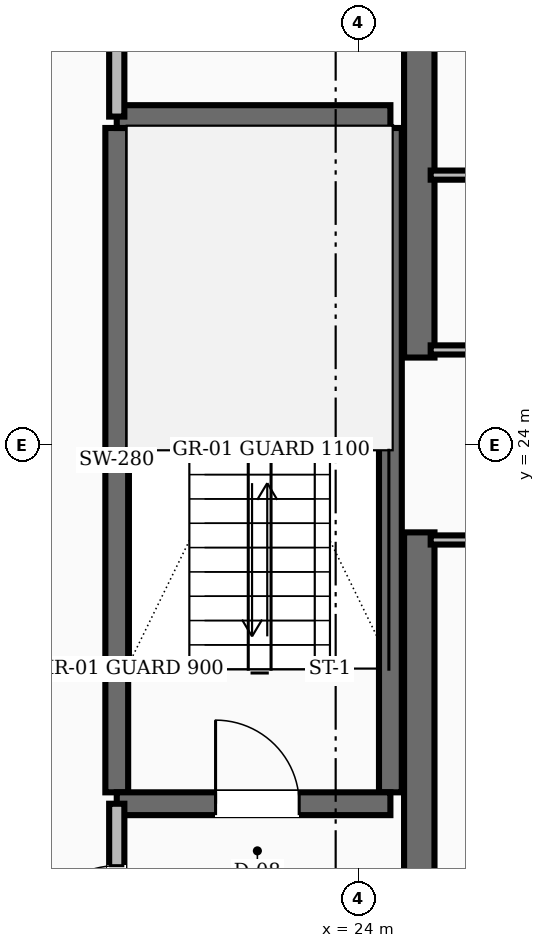
"""IFC4 building model, lengths in metres.
Left out: names, types, materials, properties, quantities, classifications, styles, units other than length and angle.
Written with IfcOpenShell. Run it as: python <this file> out.ifc"""

import sys

from ifc_helpers import new_model, si_unit, direction, frame, frame_2d, origin, place, context, subcontext, project, spatial, rectangle, extrude, element, fill, save


model = new_model("IFC4")
c1 = context("Model", 3, precision=1e-05, world=origin(), true_north=direction((0.0, 1.0)))
c2 = subcontext(c1, "Body", "Model", "MODEL_VIEW")
j1 = project(units=[si_unit("LENGTHUNIT", "METRE"), si_unit("PLANEANGLEUNIT", "RADIAN")], contexts=[c1])
p1 = place(None, origin())
s1 = spatial("IfcSite", under=j1, at=p1, CompositionType="ELEMENT")
p2 = place(p1, origin())
s2 = spatial("IfcBuilding", under=s1, at=p2, CompositionType="ELEMENT")
p3 = place(p2, frame((0.0, 0.0, 55.6)))
s3 = spatial("IfcBuildingStorey", under=s2, at=p3, CompositionType="ELEMENT", Elevation=55.6)
for number, where, z_axis, x_axis in (
    (1, (24.8, 16.55, 0.0), (0.0, 0.0, 1.0), (0.0, 1.0, 0.0)),
    (2, (24.8, 25.15, 0.0), (0.0, 0.0, 1.0), (0.0, 1.0, 0.0)),
):
    element("IfcWall", number, at=place(p3, frame(where, z_axis=z_axis, x_axis=x_axis)), inside=s3, PredefinedType="SHEAR", context=c2, shape_type="SweptSolid", body=[
        extrude(rectangle(XDim=6.3, YDim=0.4, at=frame_2d((3.15, 0.0))), origin(), (0.0, 0.0, 1.0), 3.6),
    ])
for number, where, z_axis, x_axis in (
    (3, (20.82, 19.43, 0.0), (0.0, 0.0, 1.0), (0.0, 1.0, 0.0)),
    (4, (24.42, 19.43, 0.0), (0.0, 0.0, 1.0), (0.0, 1.0, 0.0)),
):
    element("IfcWall", number, at=place(p3, frame(where, z_axis=z_axis, x_axis=x_axis)), inside=s3, PredefinedType="SHEAR", context=c2, shape_type="SweptSolid", body=[
        extrude(rectangle(XDim=8.74, YDim=0.3, at=frame_2d((4.37, 0.0))), origin(), (0.0, 0.0, 1.0), 3.6),
    ])
p4 = place(p3, frame((20.82, 19.28, 0.0), z_axis=(0.0, 0.0, 1.0), x_axis=(1.0, 0.0, 0.0)))
e5 = element("IfcWall", 5, at=p4, inside=s3, PredefinedType="SHEAR", context=c2, shape_type="SweptSolid", body=[
    extrude(rectangle(XDim=3.6, YDim=0.3, at=frame_2d((1.8, 0.0))), origin(), (0.0, 0.0, 1.0), 3.6),
])
p5 = place(p4, frame((1.3, 0.0, 0.0)))
e6 = element("IfcOpeningElement", 6, at=p5, cuts=e5, PredefinedType="OPENING", context=c2, shape_type="SweptSolid", body=[
    extrude(rectangle(XDim=1.1, YDim=2.1, at=frame_2d((0.55, 1.05))), frame((0.0, 0.16, 0.0), z_axis=(0.0, -1.0, 0.0), x_axis=(1.0, 0.0, 0.0)), (0.0, 0.0, 1.0), 0.32),
])
p6 = place(p3, frame((20.82, 28.32, 0.0), z_axis=(0.0, 0.0, 1.0), x_axis=(1.0, 0.0, 0.0)))
e7 = element("IfcWall", 7, at=p6, inside=s3, PredefinedType="SHEAR", context=c2, shape_type="SweptSolid", body=[
    extrude(rectangle(XDim=3.6, YDim=0.3, at=frame_2d((1.8, 0.0))), origin(), (0.0, 0.0, 1.0), 3.6),
])
p7 = place(p3, frame((20.82, 16.55, 0.0), z_axis=(0.0, 0.0, 1.0), x_axis=(0.0, 1.0, 0.0)))
e8 = element("IfcWall", 8, at=p7, inside=s3, PredefinedType="SOLIDWALL", context=c2, shape_type="SweptSolid", body=[
    extrude(rectangle(XDim=2.73, YDim=0.2, at=frame_2d((1.365, 0.0))), origin(), (0.0, 0.0, 1.0), 2.61),
])
p8 = place(p7, frame((0.815, 0.0, 0.0)))
e9 = element("IfcOpeningElement", 9, at=p8, cuts=e8, PredefinedType="OPENING", context=c2, shape_type="SweptSolid", body=[
    extrude(rectangle(XDim=1.1, YDim=2.1, at=frame_2d((0.55, 1.05))), frame((0.0, 0.11, 0.0), z_axis=(0.0, -1.0, 0.0), x_axis=(1.0, 0.0, 0.0)), (0.0, 0.0, 1.0), 0.22),
])
p9 = place(p3, frame((20.82, 28.32, 0.0), z_axis=(0.0, 0.0, 1.0), x_axis=(0.0, 1.0, 0.0)))
e10 = element("IfcWall", 10, at=p9, inside=s3, PredefinedType="SOLIDWALL", context=c2, shape_type="SweptSolid", body=[
    extrude(rectangle(XDim=3.13, YDim=0.2, at=frame_2d((1.565, 0.0))), origin(), (0.0, 0.0, 1.0), 2.61),
])
p10 = place(p9, frame((1.09, 0.0, 0.0)))
e11 = element("IfcOpeningElement", 11, at=p10, cuts=e10, PredefinedType="OPENING", context=c2, shape_type="SweptSolid", body=[
    extrude(rectangle(XDim=0.95, YDim=2.1, at=frame_2d((0.475, 1.05))), frame((0.0, 0.11, 0.0), z_axis=(0.0, -1.0, 0.0), x_axis=(1.0, 0.0, 0.0)), (0.0, 0.0, 1.0), 0.22),
])
p11 = place(p3, frame((24.95, 25.25, 0.0), z_axis=(0.0, 0.0, 1.0), x_axis=(1.0, 0.0, 0.0)))
e12 = element("IfcWall", 12, at=p11, inside=s3, PredefinedType="PARTITIONING", context=c2, shape_type="SweptSolid", body=[
    extrude(rectangle(XDim=3.2, YDim=0.12, at=frame_2d((1.6, 0.0))), origin(), (0.0, 0.0, 1.0), 2.61),
])
p12 = place(p11, frame((1.125, 0.0, 0.0)))
e13 = element("IfcOpeningElement", 13, at=p12, cuts=e12, PredefinedType="OPENING", context=c2, shape_type="SweptSolid", body=[
    extrude(rectangle(XDim=0.95, YDim=2.1, at=frame_2d((0.475, 1.05))), frame((0.0, 0.07, 0.0), z_axis=(0.0, -1.0, 0.0), x_axis=(1.0, 0.0, 0.0)), (0.0, 0.0, 1.0), 0.14),
])
p13 = place(p3, frame((24.95, 22.75, 0.0), z_axis=(0.0, 0.0, 1.0), x_axis=(1.0, 0.0, 0.0)))
e14 = element("IfcWall", 14, at=p13, inside=s3, PredefinedType="PARTITIONING", context=c2, shape_type="SweptSolid", body=[
    extrude(rectangle(XDim=3.2, YDim=0.12, at=frame_2d((1.6, 0.0))), origin(), (0.0, 0.0, 1.0), 2.61),
])
p14 = place(p13, frame((1.125, 0.0, 0.0)))
e15 = element("IfcOpeningElement", 15, at=p14, cuts=e14, PredefinedType="OPENING", context=c2, shape_type="SweptSolid", body=[
    extrude(rectangle(XDim=0.95, YDim=2.1, at=frame_2d((0.475, 1.05))), frame((0.0, 0.07, 0.0), z_axis=(0.0, -1.0, 0.0), x_axis=(1.0, 0.0, 0.0)), (0.0, 0.0, 1.0), 0.14),
])
p15 = place(p3, frame((24.95, 27.55, 0.0), z_axis=(0.0, 0.0, 1.0), x_axis=(1.0, 0.0, 0.0)))
e16 = element("IfcWall", 16, at=p15, inside=s3, PredefinedType="PARTITIONING", context=c2, shape_type="SweptSolid", body=[
    extrude(rectangle(XDim=3.2, YDim=0.12, at=frame_2d((1.6, 0.0))), origin(), (0.0, 0.0, 1.0), 2.61),
])
p16 = place(p15, frame((1.125, 0.0, 0.0)))
e17 = element("IfcOpeningElement", 17, at=p16, cuts=e16, PredefinedType="OPENING", context=c2, shape_type="SweptSolid", body=[
    extrude(rectangle(XDim=0.95, YDim=2.1, at=frame_2d((0.475, 1.05))), frame((0.0, 0.07, 0.0), z_axis=(0.0, -1.0, 0.0), x_axis=(1.0, 0.0, 0.0)), (0.0, 0.0, 1.0), 0.14),
])
p17 = place(p5, origin())
e18 = element("IfcDoor", 18, at=p17, inside=s3, OperationType="SINGLE_SWING_LEFT", PredefinedType="DOOR", context=c2, shape_type="SweptSolid", body=[
    extrude(rectangle(XDim=1.1, YDim=2.1, at=frame_2d((0.55, 1.05))), frame((0.0, 0.025, 0.0), z_axis=(0.0, -1.0, 0.0), x_axis=(1.0, 0.0, 0.0)), (0.0, 0.0, 1.0), 0.05),
])
fill(e6, e18)
p18 = place(p8, origin())
e19 = element("IfcDoor", 19, at=p18, inside=s3, OperationType="SINGLE_SWING_LEFT", PredefinedType="DOOR", context=c2, shape_type="SweptSolid", body=[
    extrude(rectangle(XDim=1.1, YDim=2.1, at=frame_2d((0.55, 1.05))), frame((0.0, 0.025, 0.0), z_axis=(0.0, -1.0, 0.0), x_axis=(1.0, 0.0, 0.0)), (0.0, 0.0, 1.0), 0.05),
])
fill(e9, e19)
save(model, sys.argv[1])
